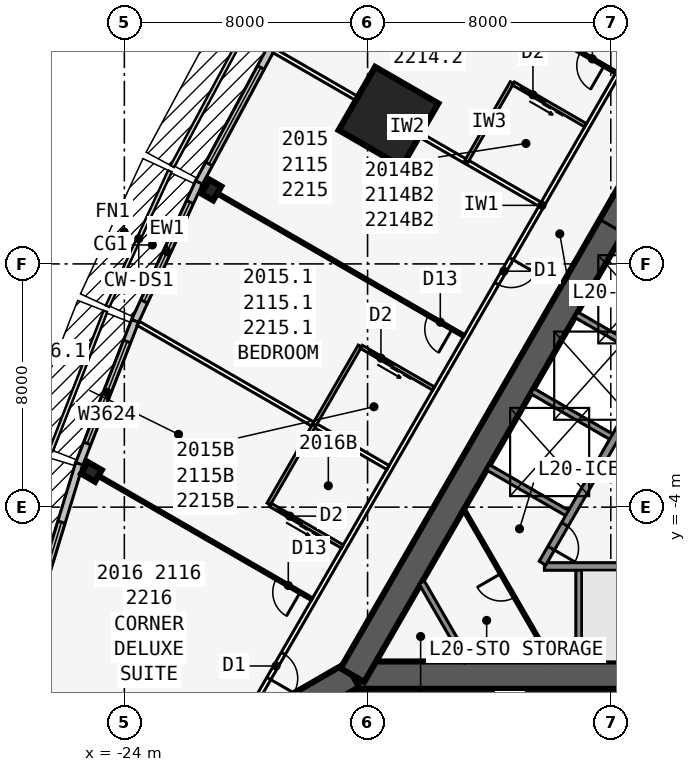
"""IFC4 building model, lengths in metres.
Left out: names, types, materials, properties, quantities, classifications, styles, units other than length and angle.
Written with IfcOpenShell. Run it as: python <this file> out.ifc"""

import sys

from ifc_helpers import new_model, si_unit, direction, frame, frame_2d, origin, origin_2d, place, context, subcontext, project, spatial, rectangle, i_section, extrude, element, fill, save


model = new_model("IFC4")
c1 = context("Model", 3, precision=1e-05, world=origin(), true_north=direction((0.0, 1.0)))
c2 = subcontext(c1, "Body", "Model", "MODEL_VIEW")
j1 = project(units=[si_unit("LENGTHUNIT", "METRE"), si_unit("PLANEANGLEUNIT", "RADIAN")], contexts=[c1])
p1 = place(None, origin())
s1 = spatial("IfcSite", under=j1, at=p1, CompositionType="ELEMENT")
p2 = place(p1, origin())
s2 = spatial("IfcBuilding", under=s1, at=p2, CompositionType="ELEMENT")
p3 = place(p2, frame((0.0, 0.0, 79.5)))
s3 = spatial("IfcBuildingStorey", under=s2, at=p3, CompositionType="ELEMENT", Elevation=79.5)
p4 = place(p3, frame((-16.5, -9.526, 0.0), z_axis=(0.0, 0.0, 1.0), x_axis=(1.0, 0.0, 0.0)))
e1 = element("IfcWall", 1, at=p4, inside=s3, PredefinedType="SHEAR", context=c2, shape_type="SweptSolid", body=[
    extrude(rectangle(XDim=33.0, YDim=0.9, at=frame_2d((16.5, 0.0))), origin(), (0.0, 0.0, 1.0), 3.4),
])
p5 = place(p4, frame((14.05, 0.0, 0.0)))
e2 = element("IfcOpeningElement", 2, at=p5, cuts=e1, PredefinedType="OPENING", context=c2, shape_type="SweptSolid", body=[
    extrude(rectangle(XDim=1.8, YDim=2.13, at=frame_2d((0.9, 1.065))), frame((0.0, 0.46, 0.0), z_axis=(0.0, -1.0, 0.0), x_axis=(1.0, 0.0, 0.0)), (0.0, 0.0, 1.0), 0.92),
])
p6 = place(p3, frame((-10.183, -5.951, 0.0), z_axis=(0.0, 0.0, 1.0), x_axis=(1.0, 0.0, 0.0)))
e3 = element("IfcWall", 3, at=p6, inside=s3, PredefinedType="SOLIDWALL", context=c2, shape_type="SweptSolid", body=[
    extrude(rectangle(XDim=7.633, YDim=0.25, at=frame_2d((3.816, 0.0))), origin(), (0.0, 0.0, 1.0), 3.235),
])
p7 = place(p3, frame((-9.05, -5.951, 0.0), z_axis=(0.0, 0.0, 1.0), x_axis=(0.0, -1.0, 0.0)))
e4 = element("IfcWall", 4, at=p7, inside=s3, PredefinedType="SOLIDWALL", context=c2, shape_type="SweptSolid", body=[
    extrude(rectangle(XDim=3.125, YDim=0.2, at=frame_2d((1.562, 0.0))), origin(), (0.0, 0.0, 1.0), 3.235),
])
p8 = place(p3, frame((0.0, 19.052, 0.0), z_axis=(0.0, 0.0, 1.0), x_axis=(-0.499999749417, -0.866025548458, 0.0)))
e5 = element("IfcWall", 5, at=p8, inside=s3, PredefinedType="SHEAR", context=c2, shape_type="SweptSolid", body=[
    extrude(rectangle(XDim=33.0, YDim=0.9, at=frame_2d((16.5, 0.0))), origin(), (0.0, 0.0, 1.0), 3.4),
])
p9 = place(p8, frame((14.15, 0.0, 0.0)))
e6 = element("IfcOpeningElement", 6, at=p9, cuts=e5, PredefinedType="OPENING", context=c2, shape_type="SweptSolid", body=[
    extrude(rectangle(XDim=1.8, YDim=2.13, at=frame_2d((0.9, 1.065))), frame((0.0, 0.46, 0.0), z_axis=(0.0, -1.0, 0.0), x_axis=(1.0, 0.0, 0.0)), (0.0, 0.0, 1.0), 0.92),
])
p10 = place(p8, frame((12.6, 0.0, 0.0)))
e7 = element("IfcOpeningElement", 7, at=p10, cuts=e5, PredefinedType="OPENING", context=c2, shape_type="SweptSolid", body=[
    extrude(rectangle(XDim=1.0, YDim=2.13, at=frame_2d((0.5, 1.065))), frame((0.0, 0.46, 0.0), z_axis=(0.0, -1.0, 0.0), x_axis=(1.0, 0.0, 0.0)), (0.0, 0.0, 1.0), 0.92),
])
p11 = place(p3, frame((-4.929, 3.365, 0.0), z_axis=(0.0, 0.0, 1.0), x_axis=(-0.499991433582, -0.866030349552, 0.0)))
e8 = element("IfcWall", 8, at=p11, inside=s3, PredefinedType="SOLIDWALL", context=c2, shape_type="SweptSolid", body=[
    extrude(rectangle(XDim=10.633, YDim=0.25, at=frame_2d((5.316, 0.0))), origin(), (0.0, 0.0, 1.0), 3.235),
])
p12 = place(p11, frame((9.164, 0.0, 0.0)))
e9 = element("IfcOpeningElement", 9, at=p12, cuts=e8, PredefinedType="OPENING", context=c2, shape_type="SweptSolid", body=[
    extrude(rectangle(XDim=0.9, YDim=2.13, at=frame_2d((0.45, 1.065))), frame((0.0, 0.135, 0.0), z_axis=(0.0, -1.0, 0.0), x_axis=(1.0, 0.0, 0.0)), (0.0, 0.0, 1.0), 0.27),
])
for number, where, z_axis, x_axis in (
    (10, (-6.429, 0.767, 0.0), (0.0, 0.0, 1.0), (-0.866, 0.5, 0.0)),
    (11, (-7.879, -1.744, 0.0), (0.0, 0.0, 1.0), (-0.866, 0.5, 0.0)),
    (12, (-9.329, -4.256, 0.0), (0.0, 0.0, 1.0), (-0.866, 0.5, 0.0)),
):
    element("IfcWall", number, at=place(p3, frame(where, z_axis=z_axis, x_axis=x_axis)), inside=s3, PredefinedType="SOLIDWALL", context=c2, shape_type="SweptSolid", body=[
        extrude(rectangle(XDim=3.125, YDim=0.2, at=frame_2d((1.562, 0.0))), origin(), (0.0, 0.0, 1.0), 3.235),
    ])
p13 = place(p3, frame((-16.5, -9.526, 0.0), z_axis=(0.0, 0.0, 1.0), x_axis=(-0.866031398331, -0.499989616998, 0.0)))
e13 = element("IfcWall", 13, at=p13, inside=s3, PredefinedType="SHEAR", context=c2, shape_type="SweptSolid", body=[
    extrude(rectangle(XDim=4.746, YDim=0.9, at=frame_2d((2.373, 0.0))), origin(), (0.0, 0.0, 1.0), 3.4),
])
p14 = place(p13, frame((1.8, 0.0, 0.0)))
e14 = element("IfcOpeningElement", 14, at=p14, cuts=e13, PredefinedType="OPENING", context=c2, shape_type="SweptSolid", body=[
    extrude(rectangle(XDim=1.8, YDim=2.13, at=frame_2d((0.9, 1.065))), frame((0.0, 0.46, 0.0), z_axis=(0.0, -1.0, 0.0), x_axis=(1.0, 0.0, 0.0)), (0.0, 0.0, 1.0), 0.92),
])
for number, where, z_axis, x_axis in (
    (15, (-21.137, 6.43, 0.0), (0.0, 0.0, 1.0), (-0.866, 0.5, 0.0)),
    (16, (-25.083, -2.839, 0.0), (0.0, 0.0, 1.0), (-0.5, -0.866, 0.0)),
):
    element("IfcColumn", number, at=place(p3, frame(where, z_axis=z_axis, x_axis=x_axis)), inside=s3, PredefinedType="COLUMN", context=c2, shape_type="SweptSolid", body=[
        extrude(i_section(OverallWidth=0.442, OverallDepth=0.531, WebThickness=0.066, FlangeThickness=0.106, at=origin_2d()), origin(), (0.0, 0.0, 1.0), 3.4),
    ])
p15 = place(p3, frame((-15.312, 8.84, 0.0), z_axis=(0.0, 0.0, 1.0), x_axis=(-0.866025403784, 0.5, 0.0)))
e17 = element("IfcColumn", 17, at=p15, inside=s3, PredefinedType="COLUMN", context=c2, shape_type="SweptSolid", body=[
    extrude(rectangle(XDim=2.4, YDim=2.4, at=origin_2d()), origin(), (0.0, 0.0, 1.0), 3.4),
])
p16 = place(p3, frame((-19.178, 11.077, 0.0), z_axis=(0.0, 0.0, 1.0), x_axis=(-0.473412820489, -0.880840678782, 0.0)))
e18 = element("IfcWall", 18, at=p16, inside=s3, PredefinedType="STANDARD", context=c2, shape_type="SweptSolid", body=[
    extrude(rectangle(XDim=5.002, YDim=0.25, at=frame_2d((2.501, 0.0))), origin(), (0.0, 0.0, 1.0), 3.235),
])
p17 = place(p16, frame((0.701, 0.0, 0.45)))
e19 = element("IfcOpeningElement", 19, at=p17, cuts=e18, PredefinedType="OPENING", context=c2, shape_type="SweptSolid", body=[
    extrude(rectangle(XDim=3.6, YDim=2.4, at=frame_2d((1.8, 1.2))), frame((0.0, 0.135, 0.0), z_axis=(0.0, -1.0, 0.0), x_axis=(1.0, 0.0, 0.0)), (0.0, 0.0, 1.0), 0.27),
])
p18 = place(p3, frame((-21.543, 6.678, 0.0), z_axis=(0.0, 0.0, 1.0), x_axis=(-0.419203100754, -0.907892482796, 0.0)))
e20 = element("IfcWall", 20, at=p18, inside=s3, PredefinedType="STANDARD", context=c2, shape_type="SweptSolid", body=[
    extrude(rectangle(XDim=5.021, YDim=0.25, at=frame_2d((2.51, 0.0))), origin(), (0.0, 0.0, 1.0), 3.235),
])
p19 = place(p18, frame((0.71, 0.0, 0.45)))
e21 = element("IfcOpeningElement", 21, at=p19, cuts=e20, PredefinedType="OPENING", context=c2, shape_type="SweptSolid", body=[
    extrude(rectangle(XDim=3.6, YDim=2.4, at=frame_2d((1.8, 1.2))), frame((0.0, 0.135, 0.0), z_axis=(0.0, -1.0, 0.0), x_axis=(1.0, 0.0, 0.0)), (0.0, 0.0, 1.0), 0.27),
])
p20 = place(p3, frame((-23.645, 2.126, 0.0), z_axis=(0.0, 0.0, 1.0), x_axis=(-0.364013463868, -0.931393685894, 0.0)))
e22 = element("IfcWall", 22, at=p20, inside=s3, PredefinedType="STANDARD", context=c2, shape_type="SweptSolid", body=[
    extrude(rectangle(XDim=5.058, YDim=0.25, at=frame_2d((2.529, 0.0))), origin(), (0.0, 0.0, 1.0), 3.235),
])
p21 = place(p20, frame((0.729, 0.0, 0.45)))
e23 = element("IfcOpeningElement", 23, at=p21, cuts=e22, PredefinedType="OPENING", context=c2, shape_type="SweptSolid", body=[
    extrude(rectangle(XDim=3.6, YDim=2.4, at=frame_2d((1.8, 1.2))), frame((0.0, 0.135, 0.0), z_axis=(0.0, -1.0, 0.0), x_axis=(1.0, 0.0, 0.0)), (0.0, 0.0, 1.0), 0.27),
])
p22 = place(p3, frame((-25.483, -2.575, 0.0), z_axis=(0.0, 0.0, 1.0), x_axis=(-0.2919790669, -0.956424709265, 0.0)))
e24 = element("IfcWall", 24, at=p22, inside=s3, PredefinedType="STANDARD", context=c2, shape_type="SweptSolid", body=[
    extrude(rectangle(XDim=8.211, YDim=0.25, at=frame_2d((4.105, 0.0))), origin(), (0.0, 0.0, 1.0), 3.235),
])
p23 = place(p22, frame((2.006, 0.0, 0.45)))
e25 = element("IfcOpeningElement", 25, at=p23, cuts=e24, PredefinedType="OPENING", context=c2, shape_type="SweptSolid", body=[
    extrude(rectangle(XDim=4.2, YDim=2.4, at=frame_2d((2.1, 1.2))), frame((0.0, 0.135, 0.0), z_axis=(0.0, -1.0, 0.0), x_axis=(1.0, 0.0, 0.0)), (0.0, 0.0, 1.0), 0.27),
])
p24 = place(p3, frame((-0.5, 22.836, 0.0), z_axis=(0.0, 0.0, 1.0), x_axis=(-0.500001677587, -0.866024435227, 0.0)))
e26 = element("IfcWall", 26, at=p24, inside=s3, PredefinedType="PARTITIONING", context=c2, shape_type="SweptSolid", body=[
    extrude(rectangle(XDim=39.054, YDim=0.15, at=frame_2d((19.527, 0.0))), origin(), (0.0, 0.0, 1.0), 3.235),
])
p25 = place(p24, frame((0.352, 0.0, 0.0)))
e27 = element("IfcOpeningElement", 27, at=p25, cuts=e26, PredefinedType="OPENING", context=c2, shape_type="SweptSolid", body=[
    extrude(rectangle(XDim=0.95, YDim=2.13, at=frame_2d((0.475, 1.065))), frame((0.0, 0.085, 0.0), z_axis=(0.0, -1.0, 0.0), x_axis=(1.0, 0.0, 0.0)), (0.0, 0.0, 1.0), 0.17),
])
p26 = place(p24, frame((11.552, 0.0, 0.0)))
e28 = element("IfcOpeningElement", 28, at=p26, cuts=e26, PredefinedType="OPENING", context=c2, shape_type="SweptSolid", body=[
    extrude(rectangle(XDim=0.95, YDim=2.13, at=frame_2d((0.475, 1.065))), frame((0.0, 0.085, 0.0), z_axis=(0.0, -1.0, 0.0), x_axis=(1.0, 0.0, 0.0)), (0.0, 0.0, 1.0), 0.17),
])
p27 = place(p24, frame((21.552, 0.0, 0.0)))
e29 = element("IfcOpeningElement", 29, at=p27, cuts=e26, PredefinedType="OPENING", context=c2, shape_type="SweptSolid", body=[
    extrude(rectangle(XDim=0.95, YDim=2.13, at=frame_2d((0.475, 1.065))), frame((0.0, 0.085, 0.0), z_axis=(0.0, -1.0, 0.0), x_axis=(1.0, 0.0, 0.0)), (0.0, 0.0, 1.0), 0.17),
])
p28 = place(p24, frame((36.546, 0.0, 0.0)))
e30 = element("IfcOpeningElement", 30, at=p28, cuts=e26, PredefinedType="OPENING", context=c2, shape_type="SweptSolid", body=[
    extrude(rectangle(XDim=0.95, YDim=2.13, at=frame_2d((0.475, 1.065))), frame((0.0, 0.085, 0.0), z_axis=(0.0, -1.0, 0.0), x_axis=(1.0, 0.0, 0.0)), (0.0, 0.0, 1.0), 0.17),
])
p29 = place(p3, frame((-7.829, 10.293, 0.0), z_axis=(0.0, 0.0, 1.0), x_axis=(-0.866016302457, 0.50001576363, 0.0)))
e31 = element("IfcWall", 31, at=p29, inside=s3, PredefinedType="PARTITIONING", context=c2, shape_type="SweptSolid", body=[
    extrude(rectangle(XDim=9.943, YDim=0.1, at=frame_2d((4.972, 0.0))), origin(), (0.0, 0.0, 1.0), 2.389),
])
p30 = place(p29, frame((0.45, 0.0, 0.0)))
e32 = element("IfcOpeningElement", 32, at=p30, cuts=e31, PredefinedType="OPENING", context=c2, shape_type="SweptSolid", body=[
    extrude(rectangle(XDim=0.9, YDim=2.13, at=frame_2d((0.45, 1.065))), frame((0.0, 0.06, 0.0), z_axis=(0.0, -1.0, 0.0), x_axis=(1.0, 0.0, 0.0)), (0.0, 0.0, 1.0), 0.12),
])
p31 = place(p3, frame((-10.329, 5.963, 0.0), z_axis=(0.0, 0.0, 1.0), x_axis=(-0.866021688545, 0.500006434927, 0.0)))
e33 = element("IfcWall", 33, at=p31, inside=s3, PredefinedType="PARTITIONING", context=c2, shape_type="SweptSolid", body=[
    extrude(rectangle(XDim=10.096, YDim=0.15, at=frame_2d((5.048, 0.0))), origin(), (0.0, 0.0, 1.0), 2.389),
])
p32 = place(p3, frame((-12.829, 1.633, 0.0), z_axis=(0.0, 0.0, 1.0), x_axis=(-0.866026934769, 0.499997348248, 0.0)))
e34 = element("IfcWall", 34, at=p32, inside=s3, PredefinedType="PARTITIONING", context=c2, shape_type="SweptSolid", body=[
    extrude(rectangle(XDim=9.943, YDim=0.1, at=frame_2d((4.971, 0.0))), origin(), (0.0, 0.0, 1.0), 2.389),
])
p33 = place(p32, frame((0.45, 0.0, 0.0)))
e35 = element("IfcOpeningElement", 35, at=p33, cuts=e34, PredefinedType="OPENING", context=c2, shape_type="SweptSolid", body=[
    extrude(rectangle(XDim=0.9, YDim=2.13, at=frame_2d((0.45, 1.065))), frame((0.0, 0.06, 0.0), z_axis=(0.0, -1.0, 0.0), x_axis=(1.0, 0.0, 0.0)), (0.0, 0.0, 1.0), 0.12),
])
p34 = place(p3, frame((-15.329, -2.697, 0.0), z_axis=(0.0, 0.0, 1.0), x_axis=(-0.866018409083, 0.500012114982, 0.0)))
e36 = element("IfcWall", 36, at=p34, inside=s3, PredefinedType="PARTITIONING", context=c2, shape_type="SweptSolid", body=[
    extrude(rectangle(XDim=9.485, YDim=0.15, at=frame_2d((4.742, 0.0))), origin(), (0.0, 0.0, 1.0), 2.389),
])
p35 = place(p3, frame((-17.829, -7.027, 0.0), z_axis=(0.0, 0.0, 1.0), x_axis=(-0.866032659912, 0.499987431809, 0.0)))
e37 = element("IfcWall", 37, at=p35, inside=s3, PredefinedType="PARTITIONING", context=c2, shape_type="SweptSolid", body=[
    extrude(rectangle(XDim=8.72, YDim=0.1, at=frame_2d((4.36, 0.0))), origin(), (0.0, 0.0, 1.0), 2.389),
])
p36 = place(p35, frame((0.45, 0.0, 0.0)))
e38 = element("IfcOpeningElement", 38, at=p36, cuts=e37, PredefinedType="OPENING", context=c2, shape_type="SweptSolid", body=[
    extrude(rectangle(XDim=0.9, YDim=2.13, at=frame_2d((0.45, 1.065))), frame((0.0, 0.06, 0.0), z_axis=(0.0, -1.0, 0.0), x_axis=(1.0, 0.0, 0.0)), (0.0, 0.0, 1.0), 0.12),
])
p37 = place(p3, frame((-11.253, 9.961, 0.0), z_axis=(0.0, 0.0, 1.0), x_axis=(-0.499990139034, -0.866031096941, 0.0)))
e39 = element("IfcWall", 39, at=p37, inside=s3, PredefinedType="PLUMBINGWALL", context=c2, shape_type="SweptSolid", body=[
    extrude(rectangle(XDim=3.0, YDim=0.12, at=frame_2d((1.5, 0.0))), origin(), (0.0, 0.0, 1.0), 3.235),
])
p38 = place(p3, frame((-8.829, 8.561, 0.0), z_axis=(0.0, 0.0, 1.0), x_axis=(-0.866035715982, 0.499982138324, 0.0)))
e40 = element("IfcWall", 40, at=p38, inside=s3, PredefinedType="PLUMBINGWALL", context=c2, shape_type="SweptSolid", body=[
    extrude(rectangle(XDim=2.74, YDim=0.12, at=frame_2d((1.37, 0.0))), origin(), (0.0, 0.0, 1.0), 3.235),
])
p39 = place(p38, frame((1.55, 0.0, 0.0)))
e41 = element("IfcOpeningElement", 41, at=p39, cuts=e40, PredefinedType="OPENING", context=c2, shape_type="SweptSolid", body=[
    extrude(rectangle(XDim=0.9, YDim=2.13, at=frame_2d((0.45, 1.065))), frame((0.0, 0.07, 0.0), z_axis=(0.0, -1.0, 0.0), x_axis=(1.0, 0.0, 0.0)), (0.0, 0.0, 1.0), 0.14),
])
p40 = place(p3, frame((-16.253, 1.301, 0.0), z_axis=(0.0, 0.0, 1.0), x_axis=(-0.499990139034, -0.866031096941, 0.0)))
e42 = element("IfcWall", 42, at=p40, inside=s3, PredefinedType="PLUMBINGWALL", context=c2, shape_type="SweptSolid", body=[
    extrude(rectangle(XDim=3.0, YDim=0.12, at=frame_2d((1.5, 0.0))), origin(), (0.0, 0.0, 1.0), 3.235),
])
p41 = place(p3, frame((-13.829, -0.099, 0.0), z_axis=(0.0, 0.0, 1.0), x_axis=(-0.865997131366, 0.500048966069, 0.0)))
e43 = element("IfcWall", 43, at=p41, inside=s3, PredefinedType="PLUMBINGWALL", context=c2, shape_type="SweptSolid", body=[
    extrude(rectangle(XDim=2.74, YDim=0.12, at=frame_2d((1.37, 0.0))), origin(), (0.0, 0.0, 1.0), 3.235),
])
p42 = place(p41, frame((1.55, 0.0, 0.0)))
e44 = element("IfcOpeningElement", 44, at=p42, cuts=e43, PredefinedType="OPENING", context=c2, shape_type="SweptSolid", body=[
    extrude(rectangle(XDim=0.9, YDim=2.13, at=frame_2d((0.45, 1.065))), frame((0.0, 0.07, 0.0), z_axis=(0.0, -1.0, 0.0), x_axis=(1.0, 0.0, 0.0)), (0.0, 0.0, 1.0), 0.14),
])
p43 = place(p3, frame((-17.753, -1.297, 0.0), z_axis=(0.0, 0.0, 1.0), x_axis=(-0.499990139034, -0.866031096941, 0.0)))
e45 = element("IfcWall", 45, at=p43, inside=s3, PredefinedType="PLUMBINGWALL", context=c2, shape_type="SweptSolid", body=[
    extrude(rectangle(XDim=3.0, YDim=0.12, at=frame_2d((1.5, 0.0))), origin(), (0.0, 0.0, 1.0), 3.235),
])
p44 = place(p3, frame((-16.829, -5.295, 0.0), z_axis=(0.0, 0.0, 1.0), x_axis=(-0.866035715982, 0.499982138324, 0.0)))
e46 = element("IfcWall", 46, at=p44, inside=s3, PredefinedType="PLUMBINGWALL", context=c2, shape_type="SweptSolid", body=[
    extrude(rectangle(XDim=2.74, YDim=0.12, at=frame_2d((1.37, 0.0))), origin(), (0.0, 0.0, 1.0), 3.235),
])
p45 = place(p44, frame((1.55, 0.0, 0.0)))
e47 = element("IfcOpeningElement", 47, at=p45, cuts=e46, PredefinedType="OPENING", context=c2, shape_type="SweptSolid", body=[
    extrude(rectangle(XDim=0.9, YDim=2.13, at=frame_2d((0.45, 1.065))), frame((0.0, 0.07, 0.0), z_axis=(0.0, -1.0, 0.0), x_axis=(1.0, 0.0, 0.0)), (0.0, 0.0, 1.0), 0.14),
])
p46 = place(p3, frame((-12.719, -9.076, 0.0), z_axis=(0.0, 0.0, 1.0), x_axis=(-0.499952404951, 0.866052881055, 0.0)))
e48 = element("IfcWall", 48, at=p46, inside=s3, PredefinedType="SOLIDWALL", context=c2, shape_type="SweptSolid", body=[
    extrude(rectangle(XDim=3.002, YDim=0.2, at=frame_2d((1.501, 0.0))), origin(), (0.0, 0.0, 1.0), 3.235),
])
p47 = place(p3, frame((-9.947, -9.076, 0.0), z_axis=(0.0, 0.0, 1.0), x_axis=(-0.500027479704, 0.866009537788, 0.0)))
e49 = element("IfcWall", 49, at=p47, inside=s3, PredefinedType="PARTITIONING", context=c2, shape_type="SweptSolid", body=[
    extrude(rectangle(XDim=5.774, YDim=0.1, at=frame_2d((2.887, 0.0))), origin(), (0.0, 0.0, 1.0), 3.235),
])
p48 = place(p47, frame((2.437, 0.0, 0.0)))
e50 = element("IfcOpeningElement", 50, at=p48, cuts=e49, PredefinedType="OPENING", context=c2, shape_type="SweptSolid", body=[
    extrude(rectangle(XDim=0.9, YDim=2.13, at=frame_2d((0.45, 1.065))), frame((0.0, 0.06, 0.0), z_axis=(0.0, -1.0, 0.0), x_axis=(1.0, 0.0, 0.0)), (0.0, 0.0, 1.0), 0.12),
])
p49 = place(p17, origin())
e51 = element("IfcWindow", 51, at=p49, inside=s3, PartitioningType="SINGLE_PANEL", PredefinedType="WINDOW", context=c2, shape_type="SweptSolid", body=[
    extrude(rectangle(XDim=3.6, YDim=2.4, at=frame_2d((1.8, 1.2))), frame((0.0, 0.03, 0.0), z_axis=(0.0, -1.0, 0.0), x_axis=(1.0, 0.0, 0.0)), (0.0, 0.0, 1.0), 0.06),
])
fill(e19, e51)
p50 = place(p19, origin())
e52 = element("IfcWindow", 52, at=p50, inside=s3, PartitioningType="SINGLE_PANEL", PredefinedType="WINDOW", context=c2, shape_type="SweptSolid", body=[
    extrude(rectangle(XDim=3.6, YDim=2.4, at=frame_2d((1.8, 1.2))), frame((0.0, 0.03, 0.0), z_axis=(0.0, -1.0, 0.0), x_axis=(1.0, 0.0, 0.0)), (0.0, 0.0, 1.0), 0.06),
])
fill(e21, e52)
p51 = place(p21, origin())
e53 = element("IfcWindow", 53, at=p51, inside=s3, PartitioningType="SINGLE_PANEL", PredefinedType="WINDOW", context=c2, shape_type="SweptSolid", body=[
    extrude(rectangle(XDim=3.6, YDim=2.4, at=frame_2d((1.8, 1.2))), frame((0.0, 0.03, 0.0), z_axis=(0.0, -1.0, 0.0), x_axis=(1.0, 0.0, 0.0)), (0.0, 0.0, 1.0), 0.06),
])
fill(e23, e53)
p52 = place(p23, origin())
e54 = element("IfcWindow", 54, at=p52, inside=s3, PartitioningType="SINGLE_PANEL", PredefinedType="WINDOW", context=c2, shape_type="SweptSolid", body=[
    extrude(rectangle(XDim=4.2, YDim=2.4, at=frame_2d((2.1, 1.2))), frame((0.0, 0.03, 0.0), z_axis=(0.0, -1.0, 0.0), x_axis=(1.0, 0.0, 0.0)), (0.0, 0.0, 1.0), 0.06),
])
fill(e25, e54)
p53 = place(p30, origin())
e55 = element("IfcDoor", 55, at=p53, inside=s3, OperationType="SINGLE_SWING_LEFT", PredefinedType="DOOR", context=c2, shape_type="SweptSolid", body=[
    extrude(rectangle(XDim=0.9, YDim=2.13, at=frame_2d((0.45, 1.065))), frame((0.0, 0.025, 0.0), z_axis=(0.0, -1.0, 0.0), x_axis=(1.0, 0.0, 0.0)), (0.0, 0.0, 1.0), 0.05),
])
fill(e32, e55)
p54 = place(p33, origin())
e56 = element("IfcDoor", 56, at=p54, inside=s3, OperationType="SINGLE_SWING_LEFT", PredefinedType="DOOR", context=c2, shape_type="SweptSolid", body=[
    extrude(rectangle(XDim=0.9, YDim=2.13, at=frame_2d((0.45, 1.065))), frame((0.0, 0.025, 0.0), z_axis=(0.0, -1.0, 0.0), x_axis=(1.0, 0.0, 0.0)), (0.0, 0.0, 1.0), 0.05),
])
fill(e35, e56)
p55 = place(p36, origin())
e57 = element("IfcDoor", 57, at=p55, inside=s3, OperationType="SINGLE_SWING_LEFT", PredefinedType="DOOR", context=c2, shape_type="SweptSolid", body=[
    extrude(rectangle(XDim=0.9, YDim=2.13, at=frame_2d((0.45, 1.065))), frame((0.0, 0.025, 0.0), z_axis=(0.0, -1.0, 0.0), x_axis=(1.0, 0.0, 0.0)), (0.0, 0.0, 1.0), 0.05),
])
fill(e38, e57)
p56 = place(p39, origin())
e58 = element("IfcDoor", 58, at=p56, inside=s3, OperationType="SLIDING_TO_LEFT", PredefinedType="DOOR", context=c2, shape_type="SweptSolid", body=[
    extrude(rectangle(XDim=0.9, YDim=2.13, at=frame_2d((0.45, 1.065))), frame((0.0, 0.025, 0.0), z_axis=(0.0, -1.0, 0.0), x_axis=(1.0, 0.0, 0.0)), (0.0, 0.0, 1.0), 0.05),
])
fill(e41, e58)
p57 = place(p27, origin())
e59 = element("IfcDoor", 59, at=p57, inside=s3, OperationType="SINGLE_SWING_LEFT", PredefinedType="DOOR", context=c2, shape_type="SweptSolid", body=[
    extrude(rectangle(XDim=0.95, YDim=2.13, at=frame_2d((0.475, 1.065))), frame((0.0, 0.025, 0.0), z_axis=(0.0, -1.0, 0.0), x_axis=(1.0, 0.0, 0.0)), (0.0, 0.0, 1.0), 0.05),
])
fill(e29, e59)
p58 = place(p42, origin())
e60 = element("IfcDoor", 60, at=p58, inside=s3, OperationType="SLIDING_TO_LEFT", PredefinedType="DOOR", context=c2, shape_type="SweptSolid", body=[
    extrude(rectangle(XDim=0.9, YDim=2.13, at=frame_2d((0.45, 1.065))), frame((0.0, 0.025, 0.0), z_axis=(0.0, -1.0, 0.0), x_axis=(1.0, 0.0, 0.0)), (0.0, 0.0, 1.0), 0.05),
])
fill(e44, e60)
p59 = place(p45, origin())
e61 = element("IfcDoor", 61, at=p59, inside=s3, OperationType="SLIDING_TO_LEFT", PredefinedType="DOOR", context=c2, shape_type="SweptSolid", body=[
    extrude(rectangle(XDim=0.9, YDim=2.13, at=frame_2d((0.45, 1.065))), frame((0.0, 0.025, 0.0), z_axis=(0.0, -1.0, 0.0), x_axis=(1.0, 0.0, 0.0)), (0.0, 0.0, 1.0), 0.05),
])
fill(e47, e61)
p60 = place(p28, origin())
e62 = element("IfcDoor", 62, at=p60, inside=s3, OperationType="SINGLE_SWING_RIGHT", PredefinedType="DOOR", context=c2, shape_type="SweptSolid", body=[
    extrude(rectangle(XDim=0.95, YDim=2.13, at=frame_2d((0.475, 1.065))), frame((0.0, 0.025, 0.0), z_axis=(0.0, -1.0, 0.0), x_axis=(1.0, 0.0, 0.0)), (0.0, 0.0, 1.0), 0.05),
])
fill(e30, e62)
p61 = place(p9, origin())
e63 = element("IfcDoor", 63, at=p61, inside=s3, OperationType="DOUBLE_DOOR_SINGLE_SWING", PredefinedType="DOOR", context=c2, shape_type="SweptSolid", body=[
    extrude(rectangle(XDim=1.8, YDim=2.13, at=frame_2d((0.9, 1.065))), frame((0.0, 0.025, 0.0), z_axis=(0.0, -1.0, 0.0), x_axis=(1.0, 0.0, 0.0)), (0.0, 0.0, 1.0), 0.05),
])
fill(e6, e63)
p62 = place(p48, origin())
e64 = element("IfcDoor", 64, at=p62, inside=s3, OperationType="SINGLE_SWING_RIGHT", PredefinedType="DOOR", context=c2, shape_type="SweptSolid", body=[
    extrude(rectangle(XDim=0.9, YDim=2.13, at=frame_2d((0.45, 1.065))), frame((0.0, 0.025, 0.0), z_axis=(0.0, -1.0, 0.0), x_axis=(1.0, 0.0, 0.0)), (0.0, 0.0, 1.0), 0.05),
])
fill(e50, e64)
p63 = place(p12, origin())
e65 = element("IfcDoor", 65, at=p63, inside=s3, OperationType="SINGLE_SWING_RIGHT", PredefinedType="DOOR", context=c2, shape_type="SweptSolid", body=[
    extrude(rectangle(XDim=0.9, YDim=2.13, at=frame_2d((0.45, 1.065))), frame((0.0, 0.025, 0.0), z_axis=(0.0, -1.0, 0.0), x_axis=(1.0, 0.0, 0.0)), (0.0, 0.0, 1.0), 0.05),
])
fill(e9, e65)
save(model, sys.argv[1])
